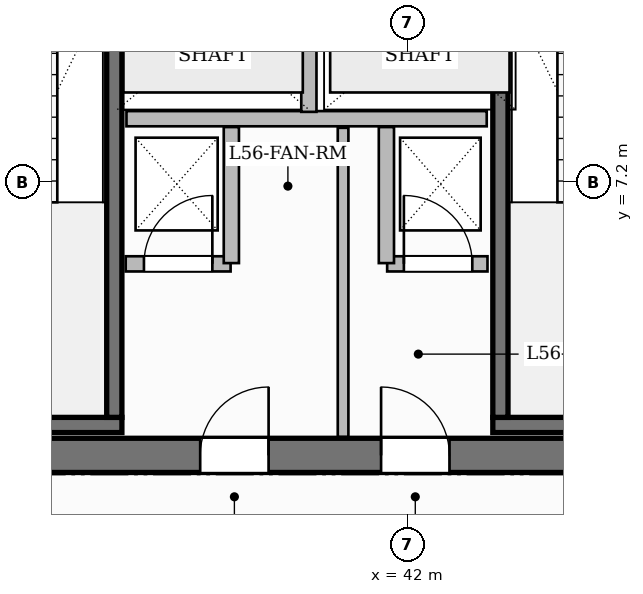
"""IFC4 building model, lengths in metres.
Left out: names, types, materials, properties, quantities, classifications, styles, units other than length and angle.
Written with IfcOpenShell. Run it as: python <this file> out.ifc"""

import sys

from ifc_helpers import new_model, si_unit, direction, frame, frame_2d, origin, place, context, subcontext, project, spatial, rectangle, extrude, source, transform, mapped, element, fill, save


model = new_model("IFC4")
c1 = context("Model", 3, precision=1e-05, world=origin(), true_north=direction((0.0, 1.0)))
c2 = subcontext(c1, "Body", "Model", "MODEL_VIEW")
j1 = project(units=[si_unit("LENGTHUNIT", "METRE"), si_unit("PLANEANGLEUNIT", "RADIAN")], contexts=[c1])
p1 = place(None, origin())
s1 = spatial("IfcSite", under=j1, at=p1, CompositionType="ELEMENT")
p2 = place(p1, origin())
s2 = spatial("IfcBuilding", under=s1, at=p2, CompositionType="ELEMENT")
p3 = place(p2, frame((0.0, 0.0, 225.0)))
s3 = spatial("IfcBuildingStorey", under=s2, at=p3, CompositionType="ELEMENT", Elevation=225.0)
p4 = place(p3, frame((34.575, 3.6, 0.0), z_axis=(0.0, 0.0, 1.0), x_axis=(1.0, 0.0, 0.0)))
e1 = element("IfcWall", 1, at=p4, inside=s3, PredefinedType="SHEAR", context=c2, shape_type="SweptSolid", body=[
    extrude(rectangle(XDim=15.45, YDim=0.45, at=frame_2d((7.725, 0.0))), origin(), (0.0, 0.0, 1.0), 3.85),
])
p5 = place(p4, frame((4.695, 0.0, 0.0)))
e2 = element("IfcOpeningElement", 2, at=p5, cuts=e1, PredefinedType="OPENING", context=c2, shape_type="SweptSolid", body=[
    extrude(rectangle(XDim=0.9, YDim=2.1, at=frame_2d((0.45, 1.05))), frame((0.0, 0.235, 0.0), z_axis=(0.0, -1.0, 0.0), x_axis=(1.0, 0.0, 0.0)), (0.0, 0.0, 1.0), 0.47),
])
p6 = place(p4, frame((7.075, 0.0, 0.0)))
e3 = element("IfcOpeningElement", 3, at=p6, cuts=e1, PredefinedType="OPENING", context=c2, shape_type="SweptSolid", body=[
    extrude(rectangle(XDim=0.9, YDim=2.1, at=frame_2d((0.45, 1.05))), frame((0.0, 0.235, 0.0), z_axis=(0.0, -1.0, 0.0), x_axis=(1.0, 0.0, 0.0)), (0.0, 0.0, 1.0), 0.47),
])
p7 = place(p3, frame((35.025, 4.0, 0.0), z_axis=(0.0, 0.0, 1.0), x_axis=(1.0, 0.0, 0.0)))
e4 = element("IfcWall", 4, at=p7, inside=s3, PredefinedType="SHEAR", context=c2, shape_type="SweptSolid", body=[
    extrude(rectangle(XDim=3.215, YDim=0.2, at=frame_2d((1.607, 0.0))), origin(), (0.0, 0.0, 1.0), 3.85),
])
p8 = place(p3, frame((38.14, 4.1, 0.0), z_axis=(0.0, 0.0, 1.0), x_axis=(0.0, 1.0, 0.0)))
e5 = element("IfcWall", 5, at=p8, inside=s3, PredefinedType="SHEAR", context=c2, shape_type="SweptSolid", body=[
    extrude(rectangle(XDim=6.95, YDim=0.2, at=frame_2d((3.475, 0.0))), origin(), (0.0, 0.0, 1.0), 3.85),
])
p9 = place(p3, frame((43.12, 4.0, 0.0), z_axis=(0.0, 0.0, 1.0), x_axis=(1.0, 0.0, 0.0)))
e6 = element("IfcWall", 6, at=p9, inside=s3, PredefinedType="SHEAR", context=c2, shape_type="SweptSolid", body=[
    extrude(rectangle(XDim=6.455, YDim=0.2, at=frame_2d((3.228, 0.0))), origin(), (0.0, 0.0, 1.0), 3.85),
])
p10 = place(p3, frame((43.22, 4.1, 0.0), z_axis=(0.0, 0.0, 1.0), x_axis=(0.0, 1.0, 0.0)))
e7 = element("IfcWall", 7, at=p10, inside=s3, PredefinedType="SHEAR", context=c2, shape_type="SweptSolid", body=[
    extrude(rectangle(XDim=6.95, YDim=0.2, at=frame_2d((3.475, 0.0))), origin(), (0.0, 0.0, 1.0), 3.85),
])
p11 = place(p3, frame((38.3, 8.03, 0.0), z_axis=(0.0, 0.0, 1.0), x_axis=(1.0, 0.0, 0.0)))
e8 = element("IfcWall", 8, at=p11, inside=s3, PredefinedType="PARTITIONING", context=c2, shape_type="SweptSolid", body=[
    extrude(rectangle(XDim=4.74, YDim=0.2, at=frame_2d((2.37, 0.0))), origin(), (0.0, 0.0, 1.0), 3.6),
])
p12 = place(p3, frame((40.7, 8.12, 0.0), z_axis=(0.0, 0.0, 1.0), x_axis=(0.0, 1.0, 0.0)))
e9 = element("IfcWall", 9, at=p12, inside=s3, PredefinedType="PARTITIONING", context=c2, shape_type="SweptSolid", body=[
    extrude(rectangle(XDim=2.18, YDim=0.2, at=frame_2d((1.09, 0.0))), origin(), (0.0, 0.0, 1.0), 3.6),
])
p13 = place(p3, frame((38.29, 6.12, 0.0), z_axis=(0.0, 0.0, 1.0), x_axis=(1.0, 0.0, 0.0)))
e10 = element("IfcWall", 10, at=p13, inside=s3, PredefinedType="PARTITIONING", context=c2, shape_type="SweptSolid", body=[
    extrude(rectangle(XDim=1.38, YDim=0.2, at=frame_2d((0.69, 0.0))), origin(), (0.0, 0.0, 1.0), 3.6),
])
p14 = place(p13, frame((0.24, 0.0, 0.0)))
e11 = element("IfcOpeningElement", 11, at=p14, cuts=e10, PredefinedType="OPENING", context=c2, shape_type="SweptSolid", body=[
    extrude(rectangle(XDim=0.9, YDim=2.1, at=frame_2d((0.45, 1.05))), frame((0.0, 0.11, 0.0), z_axis=(0.0, -1.0, 0.0), x_axis=(1.0, 0.0, 0.0)), (0.0, 0.0, 1.0), 0.22),
])
p15 = place(p3, frame((39.68, 6.13, 0.0), z_axis=(0.0, 0.0, 1.0), x_axis=(0.0, 1.0, 0.0)))
e12 = element("IfcWall", 12, at=p15, inside=s3, PredefinedType="PARTITIONING", context=c2, shape_type="SweptSolid", body=[
    extrude(rectangle(XDim=1.79, YDim=0.2, at=frame_2d((0.895, 0.0))), origin(), (0.0, 0.0, 1.0), 3.6),
])
p16 = place(p3, frame((41.73, 6.12, 0.0), z_axis=(0.0, 0.0, 1.0), x_axis=(1.0, 0.0, 0.0)))
e13 = element("IfcWall", 13, at=p16, inside=s3, PredefinedType="PARTITIONING", context=c2, shape_type="SweptSolid", body=[
    extrude(rectangle(XDim=1.32, YDim=0.2, at=frame_2d((0.66, 0.0))), origin(), (0.0, 0.0, 1.0), 3.6),
])
p17 = place(p16, frame((0.22, 0.0, 0.0)))
e14 = element("IfcOpeningElement", 14, at=p17, cuts=e13, PredefinedType="OPENING", context=c2, shape_type="SweptSolid", body=[
    extrude(rectangle(XDim=0.9, YDim=2.1, at=frame_2d((0.45, 1.05))), frame((0.0, 0.11, 0.0), z_axis=(0.0, -1.0, 0.0), x_axis=(1.0, 0.0, 0.0)), (0.0, 0.0, 1.0), 0.22),
])
p18 = place(p3, frame((41.72, 6.13, 0.0), z_axis=(0.0, 0.0, 1.0), x_axis=(0.0, 1.0, 0.0)))
e15 = element("IfcWall", 15, at=p18, inside=s3, PredefinedType="PARTITIONING", context=c2, shape_type="SweptSolid", body=[
    extrude(rectangle(XDim=1.79, YDim=0.2, at=frame_2d((0.895, 0.0))), origin(), (0.0, 0.0, 1.0), 3.6),
])
p19 = place(p3, frame((41.15, 3.845, 0.0), z_axis=(0.0, 0.0, 1.0), x_axis=(0.0, 1.0, 0.0)))
e16 = element("IfcWall", 16, at=p19, inside=s3, PredefinedType="PARTITIONING", context=c2, shape_type="SweptSolid", body=[
    extrude(rectangle(XDim=4.065, YDim=0.14, at=frame_2d((2.032, 0.0))), origin(), (0.0, 0.0, 1.0), 3.6),
])
m1 = source(origin(), c2, "Body", "SweptSolid", [
    extrude(rectangle(XDim=0.9, YDim=2.1, at=frame_2d((0.45, 1.05))), frame((0.0, 0.025, 0.0), z_axis=(0.0, -1.0, 0.0), x_axis=(1.0, 0.0, 0.0)), (0.0, 0.0, 1.0), 0.05),
])
p20 = place(p14, origin())
e17 = element("IfcDoor", 17, at=p20, inside=s3, OperationType="SINGLE_SWING_RIGHT", PredefinedType="DOOR", context=c2, shape_type="MappedRepresentation", body=[
    mapped(m1, transform((0.0, 0.0, 0.0), scale=1.0)),
])
fill(e11, e17)
p21 = place(p17, origin())
e18 = element("IfcDoor", 18, at=p21, inside=s3, OperationType="SINGLE_SWING_LEFT", PredefinedType="DOOR", context=c2, shape_type="MappedRepresentation", body=[
    mapped(m1, transform((0.0, 0.0, 0.0), scale=1.0)),
])
fill(e14, e18)
p22 = place(p5, origin())
e19 = element("IfcDoor", 19, at=p22, inside=s3, OperationType="SINGLE_SWING_RIGHT", PredefinedType="DOOR", context=c2, shape_type="MappedRepresentation", body=[
    mapped(m1, transform((0.0, 0.0, 0.0), scale=1.0)),
])
fill(e2, e19)
p23 = place(p6, origin())
e20 = element("IfcDoor", 20, at=p23, inside=s3, OperationType="SINGLE_SWING_LEFT", PredefinedType="DOOR", context=c2, shape_type="MappedRepresentation", body=[
    mapped(m1, transform((0.0, 0.0, 0.0), scale=1.0)),
])
fill(e3, e20)
save(model, sys.argv[1])
